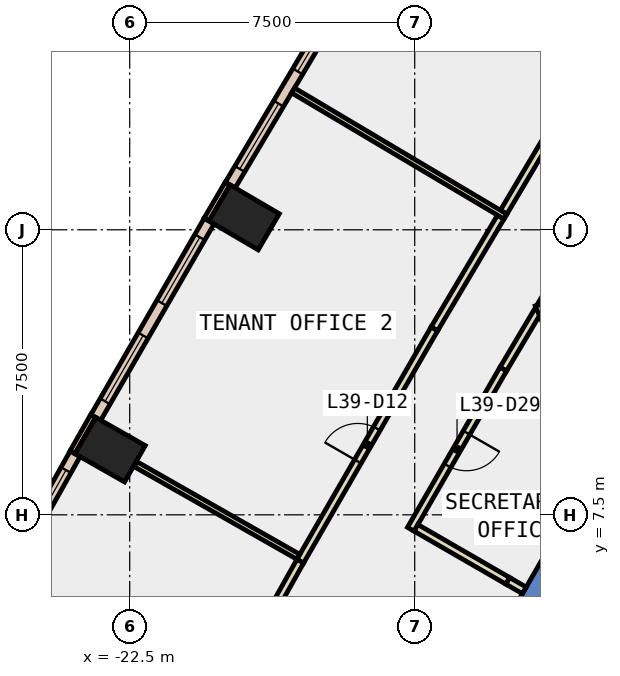
"""IFC4 building model, lengths in metres.
Left out: names, types, materials, properties, quantities, classifications, styles, units other than length and angle.
Written with IfcOpenShell. Run it as: python <this file> out.ifc"""

import sys

from ifc_helpers import new_model, si_unit, direction, frame, frame_2d, origin, origin_2d, place, context, subcontext, project, spatial, polyline, rectangle, outline, extrude, element, fill, save


model = new_model("IFC4")
c1 = context("Model", 3, precision=1e-05, world=origin(), true_north=direction((0.0, 1.0)))
c2 = subcontext(c1, "Body", "Model", "MODEL_VIEW")
j1 = project(units=[si_unit("LENGTHUNIT", "METRE"), si_unit("PLANEANGLEUNIT", "RADIAN")], contexts=[c1])
p1 = place(None, origin())
s1 = spatial("IfcSite", under=j1, at=p1, CompositionType="ELEMENT")
p2 = place(p1, origin())
s2 = spatial("IfcBuilding", under=s1, at=p2, CompositionType="ELEMENT")
p3 = place(p2, frame((0.0, 0.0, 176.0)))
s3 = spatial("IfcBuildingStorey", under=s2, at=p3, CompositionType="ELEMENT", Elevation=176.0)
for number, where, z_axis, x_axis in (
    (1, (-19.488, 15.326, -0.4), (0.0, 0.0, 1.0), (0.506, 0.863, 0.0)),
    (2, (-23.015, 9.214, -0.4), (0.0, 0.0, 1.0), (0.494, 0.869, 0.0)),
):
    element("IfcColumn", number, at=place(p3, frame(where, z_axis=z_axis, x_axis=x_axis)), inside=s3, PredefinedType="COLUMN", context=c2, shape_type="SweptSolid", body=[
        extrude(rectangle(XDim=1.1, YDim=1.5, at=origin_2d()), origin(), (0.0, 0.0, 1.0), 4.2),
    ])
p4 = place(p3, frame((0.0, 0.0, -0.4)))
e3 = element("IfcWall", 3, at=p4, inside=s3, PredefinedType="SHEAR", context=c2, shape_type="SweptSolid", body=[
    extrude(outline(polyline([(-12.267, 5.252), (-11.402, 4.752), (-6.351, 13.5), (-6.928, 14.5), (-12.267, 5.252)])), origin(), (0.0, 0.0, 1.0), 4.2),
])
p5 = place(p3, frame((-19.921, 16.217, 0.0), z_axis=(0.0, 0.0, 1.0), x_axis=(-0.50667077411, -0.862139621327, 0.0)))
e4 = element("IfcWall", 4, at=p5, inside=s3, PredefinedType="STANDARD", context=c2, shape_type="SweptSolid", body=[
    extrude(rectangle(XDim=1.1, YDim=0.15, at=frame_2d((0.55, 0.0))), origin(), (0.0, 0.0, 1.0), 3.8),
])
p6 = place(p3, frame((-23.461, 10.1, 0.0), z_axis=(0.0, 0.0, 1.0), x_axis=(-0.494512685492, -0.869170411305, 0.0)))
e5 = element("IfcWall", 5, at=p6, inside=s3, PredefinedType="STANDARD", context=c2, shape_type="SweptSolid", body=[
    extrude(rectangle(XDim=1.1, YDim=0.15, at=frame_2d((0.55, 0.0))), origin(), (0.0, 0.0, 1.0), 3.8),
])
p7 = place(p3, frame((-16.806, 21.309, 0.0), z_axis=(0.0, 0.0, 1.0), x_axis=(-0.510653096173, -0.859786842984, 0.0)))
e6 = element("IfcWall", 6, at=p7, inside=s3, PredefinedType="STANDARD", context=c2, shape_type="SweptSolid", body=[
    extrude(rectangle(XDim=5.969, YDim=0.3, at=frame_2d((2.984, 0.0))), origin(), (0.0, 0.0, 1.0), 3.8),
])
p8 = place(p7, frame((0.492, 0.0, 0.9)))
e7 = element("IfcOpeningElement", 7, at=p8, cuts=e6, PredefinedType="OPENING", context=c2, shape_type="SweptSolid", body=[
    extrude(rectangle(XDim=2.0, YDim=2.6, at=frame_2d((1.0, 1.3))), frame((0.0, 0.16, 0.0), z_axis=(0.0, -1.0, 0.0), x_axis=(1.0, 0.0, 0.0)), (0.0, 0.0, 1.0), 0.32),
])
p9 = place(p7, frame((3.477, 0.0, 0.9)))
e8 = element("IfcOpeningElement", 8, at=p9, cuts=e6, PredefinedType="OPENING", context=c2, shape_type="SweptSolid", body=[
    extrude(rectangle(XDim=2.0, YDim=2.6, at=frame_2d((1.0, 1.3))), frame((0.0, 0.16, 0.0), z_axis=(0.0, -1.0, 0.0), x_axis=(1.0, 0.0, 0.0)), (0.0, 0.0, 1.0), 0.32),
])
p10 = place(p3, frame((-20.409, 15.23, 0.0), z_axis=(0.0, 0.0, 1.0), x_axis=(-0.499908916093, -0.866077984716, 0.0)))
e9 = element("IfcWall", 9, at=p10, inside=s3, PredefinedType="STANDARD", context=c2, shape_type="SweptSolid", body=[
    extrude(rectangle(XDim=5.969, YDim=0.3, at=frame_2d((2.985, 0.0))), origin(), (0.0, 0.0, 1.0), 3.8),
])
p11 = place(p10, frame((0.492, 0.0, 0.9)))
e10 = element("IfcOpeningElement", 10, at=p11, cuts=e9, PredefinedType="OPENING", context=c2, shape_type="SweptSolid", body=[
    extrude(rectangle(XDim=2.0, YDim=2.6, at=frame_2d((1.0, 1.3))), frame((0.0, 0.16, 0.0), z_axis=(0.0, -1.0, 0.0), x_axis=(1.0, 0.0, 0.0)), (0.0, 0.0, 1.0), 0.32),
])
p12 = place(p10, frame((3.477, 0.0, 0.9)))
e11 = element("IfcOpeningElement", 11, at=p12, cuts=e9, PredefinedType="OPENING", context=c2, shape_type="SweptSolid", body=[
    extrude(rectangle(XDim=2.0, YDim=2.6, at=frame_2d((1.0, 1.3))), frame((0.0, 0.16, 0.0), z_axis=(0.0, -1.0, 0.0), x_axis=(1.0, 0.0, 0.0)), (0.0, 0.0, 1.0), 0.32),
])
p13 = place(p3, frame((-23.936, 9.106, 0.0), z_axis=(0.0, 0.0, 1.0), x_axis=(-0.489305602904, -0.872112393541, 0.0)))
e12 = element("IfcWall", 12, at=p13, inside=s3, PredefinedType="STANDARD", context=c2, shape_type="SweptSolid", body=[
    extrude(rectangle(XDim=5.969, YDim=0.3, at=frame_2d((2.985, 0.0))), origin(), (0.0, 0.0, 1.0), 3.8),
])
p14 = place(p13, frame((0.492, 0.0, 0.9)))
e13 = element("IfcOpeningElement", 13, at=p14, cuts=e12, PredefinedType="OPENING", context=c2, shape_type="SweptSolid", body=[
    extrude(rectangle(XDim=2.0, YDim=2.6, at=frame_2d((1.0, 1.3))), frame((0.0, 0.16, 0.0), z_axis=(0.0, -1.0, 0.0), x_axis=(1.0, 0.0, 0.0)), (0.0, 0.0, 1.0), 0.32),
])
p15 = place(p13, frame((3.477, 0.0, 0.9)))
e14 = element("IfcOpeningElement", 14, at=p15, cuts=e12, PredefinedType="OPENING", context=c2, shape_type="SweptSolid", body=[
    extrude(rectangle(XDim=2.0, YDim=2.6, at=frame_2d((1.0, 1.3))), frame((0.0, 0.16, 0.0), z_axis=(0.0, -1.0, 0.0), x_axis=(1.0, 0.0, 0.0)), (0.0, 0.0, 1.0), 0.32),
])
p16 = place(p3, frame((-10.484, 15.014, 0.0), z_axis=(0.0, 0.0, 1.0), x_axis=(-0.510627855782, -0.859801833506, 0.0)))
e15 = element("IfcWall", 15, at=p16, inside=s3, PredefinedType="PARTITIONING", context=c2, shape_type="SweptSolid", body=[
    extrude(rectangle(XDim=2.342, YDim=0.2, at=frame_2d((1.171, 0.0))), origin(), (0.0, 0.0, 1.0), 3.75),
])
p17 = place(p16, frame((0.671, 0.0, 0.0)))
e16 = element("IfcOpeningElement", 16, at=p17, cuts=e15, PredefinedType="OPENING", context=c2, shape_type="SweptSolid", body=[
    extrude(rectangle(XDim=1.0, YDim=2.1, at=frame_2d((0.5, 1.05))), frame((0.0, 0.11, 0.0), z_axis=(0.0, -1.0, 0.0), x_axis=(1.0, 0.0, 0.0)), (0.0, 0.0, 1.0), 0.22),
])
p18 = place(p3, frame((-11.757, 12.871, 0.0), z_axis=(0.0, 0.0, 1.0), x_axis=(-0.510614478889, -0.85980977777, 0.0)))
e17 = element("IfcWall", 17, at=p18, inside=s3, PredefinedType="PARTITIONING", context=c2, shape_type="SweptSolid", body=[
    extrude(rectangle(XDim=1.788, YDim=0.2, at=frame_2d((0.894, 0.0))), origin(), (0.0, 0.0, 1.0), 3.75),
])
p19 = place(p3, frame((-12.67, 11.334, 0.0), z_axis=(0.0, 0.0, 1.0), x_axis=(-0.500035159864, -0.866005103276, 0.0)))
e18 = element("IfcWall", 18, at=p19, inside=s3, PredefinedType="PARTITIONING", context=c2, shape_type="SweptSolid", body=[
    extrude(rectangle(XDim=4.866, YDim=0.2, at=frame_2d((2.433, 0.0))), origin(), (0.0, 0.0, 1.0), 3.75),
])
p20 = place(p19, frame((1.933, 0.0, 0.0)))
e19 = element("IfcOpeningElement", 19, at=p20, cuts=e18, PredefinedType="OPENING", context=c2, shape_type="SweptSolid", body=[
    extrude(rectangle(XDim=1.0, YDim=2.1, at=frame_2d((0.5, 1.05))), frame((0.0, 0.11, 0.0), z_axis=(0.0, -1.0, 0.0), x_axis=(1.0, 0.0, 0.0)), (0.0, 0.0, 1.0), 0.22),
])
p21 = place(p3, frame((-14.966, 7.157, 0.0), z_axis=(0.0, 0.0, 1.0), x_axis=(0.86600487494, -0.500035555316, 0.0)))
e20 = element("IfcWall", 20, at=p21, inside=s3, PredefinedType="PARTITIONING", context=c2, shape_type="SweptSolid", body=[
    extrude(rectangle(XDim=2.79, YDim=0.2, at=frame_2d((1.395, 0.0))), origin(), (0.0, 0.0, 1.0), 3.75),
])
p22 = place(p3, frame((-12.66, 15.463, 0.0), z_axis=(0.0, 0.0, 1.0), x_axis=(0.510477693133, 0.85989099589, 0.0)))
e21 = element("IfcWall", 21, at=p22, inside=s3, PredefinedType="PARTITIONING", context=c2, shape_type="SweptSolid", body=[
    extrude(rectangle(XDim=3.418, YDim=0.2, at=frame_2d((1.709, 0.0))), origin(), (0.0, 0.0, 1.0), 3.75),
])
p23 = place(p3, frame((-18.012, 6.28, 0.0), z_axis=(0.0, 0.0, 1.0), x_axis=(0.49995092924, 0.866053732947, 0.0)))
e22 = element("IfcWall", 22, at=p23, inside=s3, PredefinedType="PARTITIONING", context=c2, shape_type="SweptSolid", body=[
    extrude(rectangle(XDim=7.061, YDim=0.2, at=frame_2d((3.53, 0.0))), origin(), (0.0, 0.0, 1.0), 3.75),
])
p24 = place(p23, frame((3.03, 0.0, 0.0)))
e23 = element("IfcOpeningElement", 23, at=p24, cuts=e22, PredefinedType="OPENING", context=c2, shape_type="SweptSolid", body=[
    extrude(rectangle(XDim=1.0, YDim=2.1, at=frame_2d((0.5, 1.05))), frame((0.0, 0.11, 0.0), z_axis=(0.0, -1.0, 0.0), x_axis=(1.0, 0.0, 0.0)), (0.0, 0.0, 1.0), 0.22),
])
p25 = place(p3, frame((-14.482, 12.395, 0.0), z_axis=(0.0, 0.0, 1.0), x_axis=(0.51050904729, 0.859872381598, 0.0)))
e24 = element("IfcWall", 24, at=p25, inside=s3, PredefinedType="PARTITIONING", context=c2, shape_type="SweptSolid", body=[
    extrude(rectangle(XDim=3.418, YDim=0.2, at=frame_2d((1.709, 0.0))), origin(), (0.0, 0.0, 1.0), 3.75),
])
p26 = place(p3, frame((-21.43, 0.185, 0.0), z_axis=(0.0, 0.0, 1.0), x_axis=(0.489124577711, 0.872213934468, 0.0)))
e25 = element("IfcWall", 25, at=p26, inside=s3, PredefinedType="PARTITIONING", context=c2, shape_type="SweptSolid", body=[
    extrude(rectangle(XDim=6.988, YDim=0.2, at=frame_2d((3.494, 0.0))), origin(), (0.0, 0.0, 1.0), 3.75),
])
p27 = place(p26, frame((3.069, 0.0, 0.0)))
e26 = element("IfcOpeningElement", 26, at=p27, cuts=e25, PredefinedType="OPENING", context=c2, shape_type="SweptSolid", body=[
    extrude(rectangle(XDim=1.0, YDim=2.1, at=frame_2d((0.5, 1.05))), frame((0.0, 0.11, 0.0), z_axis=(0.0, -1.0, 0.0), x_axis=(1.0, 0.0, 0.0)), (0.0, 0.0, 1.0), 0.22),
])
p28 = place(p3, frame((-10.076, 9.047, 0.0), z_axis=(0.0, 0.0, 1.0), x_axis=(-0.389223462263, 0.921143363665, 0.0)))
e27 = element("IfcWall", 27, at=p28, inside=s3, PredefinedType="PARTITIONING", context=c2, shape_type="SweptSolid", body=[
    extrude(rectangle(XDim=4.322, YDim=0.15, at=frame_2d((2.161, 0.0))), origin(), (0.0, 0.0, 1.0), 3.75),
])
p29 = place(p3, frame((-12.613, 15.348, 0.0), z_axis=(0.0, 0.0, 1.0), x_axis=(-0.85976815765, 0.510684555368, 0.0)))
e28 = element("IfcWall", 28, at=p29, inside=s3, PredefinedType="PARTITIONING", context=c2, shape_type="SweptSolid", body=[
    extrude(rectangle(XDim=6.499, YDim=0.15, at=frame_2d((3.25, 0.0))), origin(), (0.0, 0.0, 1.0), 3.75),
])
p30 = place(p3, frame((-18.062, 6.395, 0.0), z_axis=(0.0, 0.0, 1.0), x_axis=(-0.869113540562, 0.494612629854, 0.0)))
e29 = element("IfcWall", 29, at=p30, inside=s3, PredefinedType="PARTITIONING", context=c2, shape_type="SweptSolid", body=[
    extrude(rectangle(XDim=4.929, YDim=0.15, at=frame_2d((2.465, 0.0))), origin(), (0.0, 0.0, 1.0), 3.75),
])
p31 = place(p3, frame((-12.55, 5.762, 0.0), z_axis=(0.0, 0.0, 1.0), x_axis=(0.866071776036, -0.499919672301, 0.0)))
e30 = element("IfcWall", 30, at=p31, inside=s3, PredefinedType="PARTITIONING", context=c2, shape_type="SweptSolid", body=[
    extrude(rectangle(XDim=0.5, YDim=0.2, at=frame_2d((0.25, 0.0))), origin(), (0.0, 0.0, 1.0), 2.4),
])
p32 = place(p8, origin())
e31 = element("IfcWindow", 31, at=p32, inside=s3, PartitioningType="SINGLE_PANEL", PredefinedType="WINDOW", context=c2, shape_type="SweptSolid", body=[
    extrude(rectangle(XDim=2.0, YDim=2.6, at=frame_2d((1.0, 1.3))), frame((0.0, 0.03, 0.0), z_axis=(0.0, -1.0, 0.0), x_axis=(1.0, 0.0, 0.0)), (0.0, 0.0, 1.0), 0.06),
])
fill(e7, e31)
p33 = place(p9, origin())
e32 = element("IfcWindow", 32, at=p33, inside=s3, PartitioningType="SINGLE_PANEL", PredefinedType="WINDOW", context=c2, shape_type="SweptSolid", body=[
    extrude(rectangle(XDim=2.0, YDim=2.6, at=frame_2d((1.0, 1.3))), frame((0.0, 0.03, 0.0), z_axis=(0.0, -1.0, 0.0), x_axis=(1.0, 0.0, 0.0)), (0.0, 0.0, 1.0), 0.06),
])
fill(e8, e32)
p34 = place(p11, origin())
e33 = element("IfcWindow", 33, at=p34, inside=s3, PartitioningType="SINGLE_PANEL", PredefinedType="WINDOW", context=c2, shape_type="SweptSolid", body=[
    extrude(rectangle(XDim=2.0, YDim=2.6, at=frame_2d((1.0, 1.3))), frame((0.0, 0.03, 0.0), z_axis=(0.0, -1.0, 0.0), x_axis=(1.0, 0.0, 0.0)), (0.0, 0.0, 1.0), 0.06),
])
fill(e10, e33)
p35 = place(p12, origin())
e34 = element("IfcWindow", 34, at=p35, inside=s3, PartitioningType="SINGLE_PANEL", PredefinedType="WINDOW", context=c2, shape_type="SweptSolid", body=[
    extrude(rectangle(XDim=2.0, YDim=2.6, at=frame_2d((1.0, 1.3))), frame((0.0, 0.03, 0.0), z_axis=(0.0, -1.0, 0.0), x_axis=(1.0, 0.0, 0.0)), (0.0, 0.0, 1.0), 0.06),
])
fill(e11, e34)
p36 = place(p14, origin())
e35 = element("IfcWindow", 35, at=p36, inside=s3, PartitioningType="SINGLE_PANEL", PredefinedType="WINDOW", context=c2, shape_type="SweptSolid", body=[
    extrude(rectangle(XDim=2.0, YDim=2.6, at=frame_2d((1.0, 1.3))), frame((0.0, 0.03, 0.0), z_axis=(0.0, -1.0, 0.0), x_axis=(1.0, 0.0, 0.0)), (0.0, 0.0, 1.0), 0.06),
])
fill(e13, e35)
p37 = place(p24, origin())
e36 = element("IfcDoor", 36, at=p37, inside=s3, OperationType="SINGLE_SWING_LEFT", PredefinedType="DOOR", context=c2, shape_type="SweptSolid", body=[
    extrude(rectangle(XDim=1.0, YDim=2.1, at=frame_2d((0.5, 1.05))), frame((0.0, 0.025, 0.0), z_axis=(0.0, -1.0, 0.0), x_axis=(1.0, 0.0, 0.0)), (0.0, 0.0, 1.0), 0.05),
])
fill(e23, e36)
p38 = place(p20, origin())
e37 = element("IfcDoor", 37, at=p38, inside=s3, OperationType="SINGLE_SWING_LEFT", PredefinedType="DOOR", context=c2, shape_type="SweptSolid", body=[
    extrude(rectangle(XDim=1.0, YDim=2.1, at=frame_2d((0.5, 1.05))), frame((0.0, 0.025, 0.0), z_axis=(0.0, -1.0, 0.0), x_axis=(1.0, 0.0, 0.0)), (0.0, 0.0, 1.0), 0.05),
])
fill(e19, e37)
save(model, sys.argv[1])
